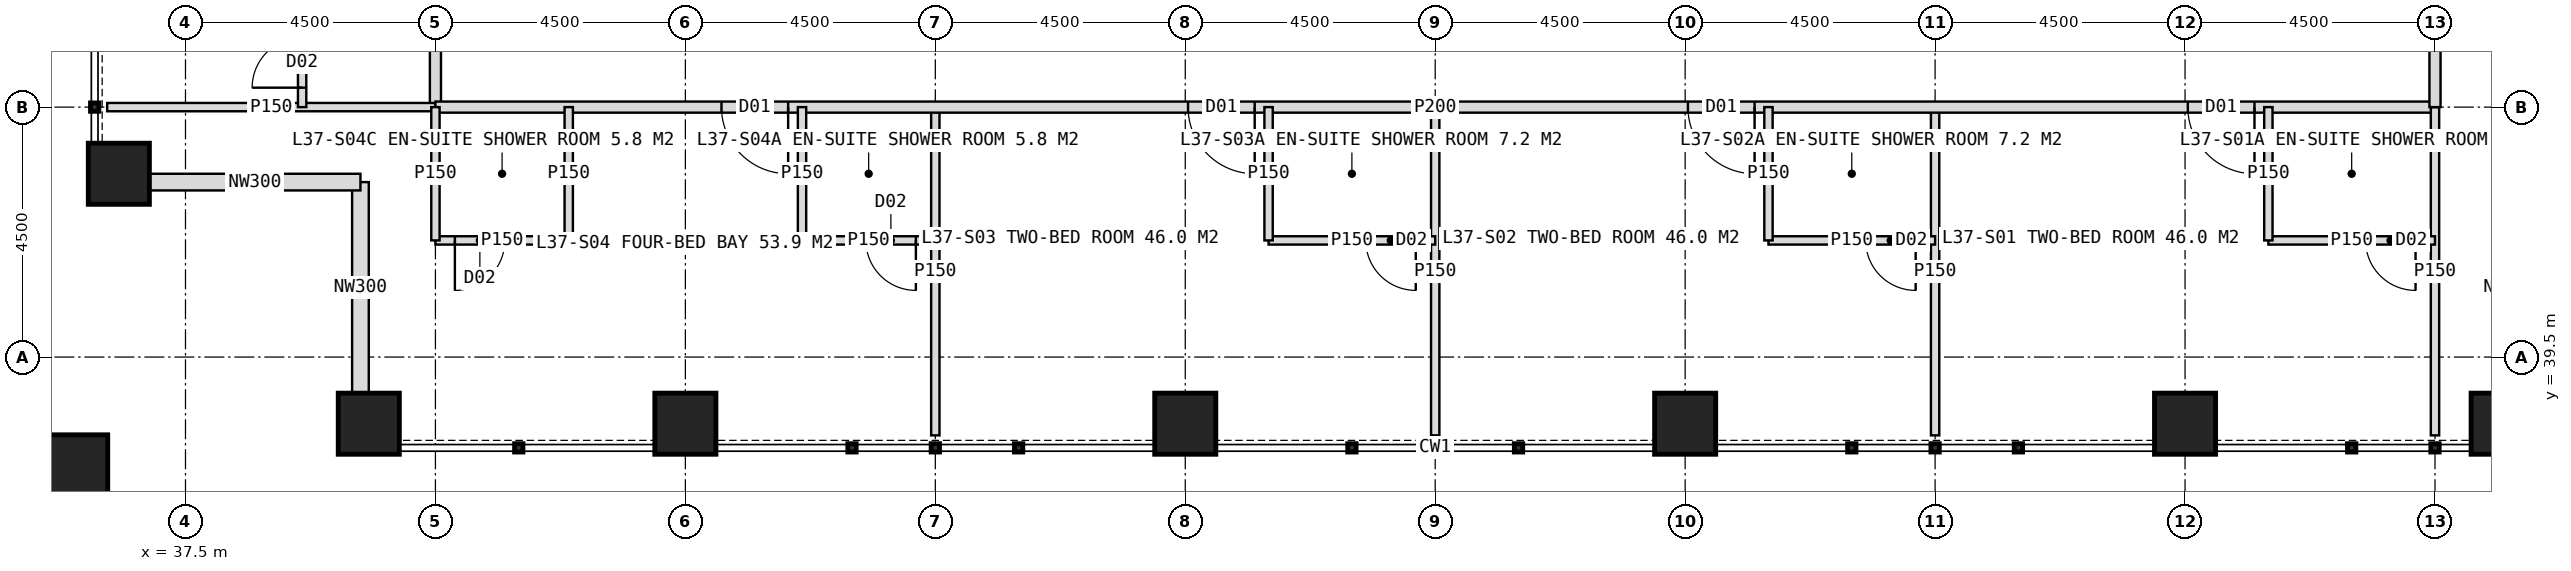
"""IFC4 building model, lengths in metres.
Left out: names, types, materials, properties, quantities, classifications, styles, units other than length and angle.
Written with IfcOpenShell. Run it as: python <this file> out.ifc"""

import sys

from ifc_helpers import new_model, si_unit, direction, frame, frame_2d, origin, origin_2d, place, context, subcontext, project, spatial, rectangle, hollow_rectangle, extrude, element, fill, save


model = new_model("IFC4")
c1 = context("Model", 3, precision=1e-05, world=origin(), true_north=direction((0.0, 1.0)))
c2 = subcontext(c1, "Body", "Model", "MODEL_VIEW")
j1 = project(units=[si_unit("LENGTHUNIT", "METRE"), si_unit("PLANEANGLEUNIT", "RADIAN")], contexts=[c1])
p1 = place(None, origin())
s1 = spatial("IfcSite", under=j1, at=p1, CompositionType="ELEMENT")
p2 = place(p1, origin())
s2 = spatial("IfcBuilding", under=s1, at=p2, CompositionType="ELEMENT")
p3 = place(p2, frame((0.0, 0.0, 156.0)))
s3 = spatial("IfcBuildingStorey", under=s2, at=p3, CompositionType="ELEMENT", Elevation=156.0)
for number, where, z_axis, x_axis in (
    (1, (40.8, 38.3, 0.0), (0.0, 0.0, 1.0), (1.0, 0.0, 0.0)),
    (2, (36.3, 42.8, 0.0), (0.0, 0.0, 1.0), (1.0, 0.0, 0.0)),
    (3, (46.5, 38.3, 0.0), (0.0, 0.0, 1.0), (1.0, 0.0, 0.0)),
    (4, (55.5, 38.3, 0.0), (0.0, 0.0, 1.0), (1.0, 0.0, 0.0)),
    (5, (64.5, 38.3, 0.0), (0.0, 0.0, 1.0), (1.0, 0.0, 0.0)),
    (6, (73.5, 38.3, 0.0), (0.0, 0.0, 1.0), (1.0, 0.0, 0.0)),
    (7, (79.2, 38.3, 0.0), (0.0, 0.0, 1.0), (1.0, 0.0, 0.0)),
):
    element("IfcColumn", number, at=place(p3, frame(where, z_axis=z_axis, x_axis=x_axis)), inside=s3, PredefinedType="COLUMN", context=c2, shape_type="SweptSolid", body=[
        extrude(hollow_rectangle(XDim=1.1, YDim=1.1, WallThickness=0.1, at=origin_2d()), origin(), (0.0, 0.0, 1.0), 4.0),
    ])
p4 = place(p3, frame((35.4, 37.4, 0.0), z_axis=(0.0, 0.0, 1.0), x_axis=(1.0, 0.0, 0.0)))
e8 = element("IfcColumn", 8, at=p4, inside=s3, PredefinedType="COLUMN", context=c2, shape_type="SweptSolid", body=[
    extrude(hollow_rectangle(XDim=1.4, YDim=1.4, WallThickness=0.08, at=origin_2d()), origin(), (0.0, 0.0, 1.0), 4.0),
])
for number, where, z_axis, x_axis in (
    (9, (40.65, 38.85, 0.0), (0.0, 0.0, 1.0), (0.0, 1.0, 0.0)),
    (10, (40.65, 42.65, 0.0), (0.0, 0.0, 1.0), (-1.0, 0.0, 0.0)),
):
    element("IfcWall", number, at=place(p3, frame(where, z_axis=z_axis, x_axis=x_axis)), inside=s3, PredefinedType="ELEMENTEDWALL", context=c2, shape_type="SweptSolid", body=[
        extrude(rectangle(XDim=3.8, YDim=0.3, at=frame_2d((1.9, 0.0))), origin(), (0.0, 0.0, 1.0), 4.0),
    ])
p5 = place(p3, frame((42.0, 44.0, 0.0), z_axis=(0.0, 0.0, 1.0), x_axis=(0.0, 1.0, 0.0)))
e11 = element("IfcWall", 11, at=p5, inside=s3, PredefinedType="PARTITIONING", context=c2, shape_type="SweptSolid", body=[
    extrude(rectangle(XDim=36.0, YDim=0.2, at=frame_2d((18.0, 0.0))), origin(), (0.0, 0.0, 1.0), 3.75),
])
p6 = place(p5, frame((3.25, 0.0, 0.0)))
e12 = element("IfcOpeningElement", 12, at=p6, cuts=e11, PredefinedType="OPENING", context=c2, shape_type="SweptSolid", body=[
    extrude(rectangle(XDim=1.2, YDim=2.2, at=frame_2d((0.6, 1.1))), frame((0.0, 0.11, 0.0), z_axis=(0.0, -1.0, 0.0), x_axis=(1.0, 0.0, 0.0)), (0.0, 0.0, 1.0), 0.22),
])
p7 = place(p5, frame((12.25, 0.0, 0.0)))
e13 = element("IfcOpeningElement", 13, at=p7, cuts=e11, PredefinedType="OPENING", context=c2, shape_type="SweptSolid", body=[
    extrude(rectangle(XDim=1.2, YDim=2.2, at=frame_2d((0.6, 1.1))), frame((0.0, 0.11, 0.0), z_axis=(0.0, -1.0, 0.0), x_axis=(1.0, 0.0, 0.0)), (0.0, 0.0, 1.0), 0.22),
])
p8 = place(p5, frame((21.25, 0.0, 0.0)))
e14 = element("IfcOpeningElement", 14, at=p8, cuts=e11, PredefinedType="OPENING", context=c2, shape_type="SweptSolid", body=[
    extrude(rectangle(XDim=1.2, YDim=2.2, at=frame_2d((0.6, 1.1))), frame((0.0, 0.11, 0.0), z_axis=(0.0, -1.0, 0.0), x_axis=(1.0, 0.0, 0.0)), (0.0, 0.0, 1.0), 0.22),
])
p9 = place(p5, frame((31.75, 0.0, 0.0)))
e15 = element("IfcOpeningElement", 15, at=p9, cuts=e11, PredefinedType="OPENING", context=c2, shape_type="SweptSolid", body=[
    extrude(rectangle(XDim=1.2, YDim=2.2, at=frame_2d((0.6, 1.1))), frame((0.0, 0.11, 0.0), z_axis=(0.0, -1.0, 0.0), x_axis=(1.0, 0.0, 0.0)), (0.0, 0.0, 1.0), 0.22),
])
p10 = place(p3, frame((42.0, 44.0, 0.0), z_axis=(0.0, 0.0, 1.0), x_axis=(-1.0, 0.0, 0.0)))
e16 = element("IfcWall", 16, at=p10, inside=s3, PredefinedType="PARTITIONING", context=c2, shape_type="SweptSolid", body=[
    extrude(rectangle(XDim=5.91, YDim=0.15, at=frame_2d((2.955, 0.0))), origin(), (0.0, 0.0, 1.0), 3.75),
])
p11 = place(p3, frame((39.6, 44.0, 0.0), z_axis=(0.0, 0.0, 1.0), x_axis=(0.0, 1.0, 0.0)))
e17 = element("IfcWall", 17, at=p11, inside=s3, PredefinedType="PARTITIONING", context=c2, shape_type="SweptSolid", body=[
    extrude(rectangle(XDim=3.0, YDim=0.15, at=frame_2d((1.5, 0.0))), origin(), (0.0, 0.0, 1.0), 3.75),
])
p12 = place(p11, frame((0.35, 0.0, 0.0)))
e18 = element("IfcOpeningElement", 18, at=p12, cuts=e17, PredefinedType="OPENING", context=c2, shape_type="SweptSolid", body=[
    extrude(rectangle(XDim=0.9, YDim=2.1, at=frame_2d((0.45, 1.05))), frame((0.0, 0.085, 0.0), z_axis=(0.0, -1.0, 0.0), x_axis=(1.0, 0.0, 0.0)), (0.0, 0.0, 1.0), 0.17),
])
p13 = place(p3, frame((69.0, 44.0, 0.0), z_axis=(0.0, 0.0, 1.0), x_axis=(0.0, -1.0, 0.0)))
e19 = element("IfcWall", 19, at=p13, inside=s3, PredefinedType="PARTITIONING", context=c2, shape_type="SweptSolid", body=[
    extrude(rectangle(XDim=5.91, YDim=0.15, at=frame_2d((2.955, 0.0))), origin(), (0.0, 0.0, 1.0), 3.75),
])
p14 = place(p3, frame((60.0, 44.0, 0.0), z_axis=(0.0, 0.0, 1.0), x_axis=(0.0, -1.0, 0.0)))
e20 = element("IfcWall", 20, at=p14, inside=s3, PredefinedType="PARTITIONING", context=c2, shape_type="SweptSolid", body=[
    extrude(rectangle(XDim=5.91, YDim=0.15, at=frame_2d((2.955, 0.0))), origin(), (0.0, 0.0, 1.0), 2.95),
])
p15 = place(p3, frame((51.0, 44.0, 0.0), z_axis=(0.0, 0.0, 1.0), x_axis=(0.0, -1.0, 0.0)))
e21 = element("IfcWall", 21, at=p15, inside=s3, PredefinedType="PARTITIONING", context=c2, shape_type="SweptSolid", body=[
    extrude(rectangle(XDim=5.91, YDim=0.15, at=frame_2d((2.955, 0.0))), origin(), (0.0, 0.0, 1.0), 3.75),
])
p16 = place(p3, frame((78.0, 44.0, 0.0), z_axis=(0.0, 0.0, 1.0), x_axis=(-1.0, 0.0, 0.0)))
e22 = element("IfcWall", 22, at=p16, inside=s3, PredefinedType="PARTITIONING", context=c2, shape_type="SweptSolid", body=[
    extrude(rectangle(XDim=36.0, YDim=0.2, at=frame_2d((18.0, 0.0))), origin(), (0.0, 0.0, 1.0), 3.75),
])
p17 = place(p16, frame((3.25, 0.0, 0.0)))
e23 = element("IfcOpeningElement", 23, at=p17, cuts=e22, PredefinedType="OPENING", context=c2, shape_type="SweptSolid", body=[
    extrude(rectangle(XDim=1.2, YDim=2.2, at=frame_2d((0.6, 1.1))), frame((0.0, 0.11, 0.0), z_axis=(0.0, -1.0, 0.0), x_axis=(1.0, 0.0, 0.0)), (0.0, 0.0, 1.0), 0.22),
])
p18 = place(p16, frame((12.25, 0.0, 0.0)))
e24 = element("IfcOpeningElement", 24, at=p18, cuts=e22, PredefinedType="OPENING", context=c2, shape_type="SweptSolid", body=[
    extrude(rectangle(XDim=1.2, YDim=2.2, at=frame_2d((0.6, 1.1))), frame((0.0, 0.11, 0.0), z_axis=(0.0, -1.0, 0.0), x_axis=(1.0, 0.0, 0.0)), (0.0, 0.0, 1.0), 0.22),
])
p19 = place(p16, frame((21.25, 0.0, 0.0)))
e25 = element("IfcOpeningElement", 25, at=p19, cuts=e22, PredefinedType="OPENING", context=c2, shape_type="SweptSolid", body=[
    extrude(rectangle(XDim=1.2, YDim=2.2, at=frame_2d((0.6, 1.1))), frame((0.0, 0.11, 0.0), z_axis=(0.0, -1.0, 0.0), x_axis=(1.0, 0.0, 0.0)), (0.0, 0.0, 1.0), 0.22),
])
p20 = place(p16, frame((29.65, 0.0, 0.0)))
e26 = element("IfcOpeningElement", 26, at=p20, cuts=e22, PredefinedType="OPENING", context=c2, shape_type="SweptSolid", body=[
    extrude(rectangle(XDim=1.2, YDim=2.2, at=frame_2d((0.6, 1.1))), frame((0.0, 0.11, 0.0), z_axis=(0.0, -1.0, 0.0), x_axis=(1.0, 0.0, 0.0)), (0.0, 0.0, 1.0), 0.22),
])
p21 = place(p3, frame((78.0, 44.0, 0.0), z_axis=(0.0, 0.0, 1.0), x_axis=(0.0, -1.0, 0.0)))
e27 = element("IfcWall", 27, at=p21, inside=s3, PredefinedType="PARTITIONING", context=c2, shape_type="SweptSolid", body=[
    extrude(rectangle(XDim=5.91, YDim=0.15, at=frame_2d((2.955, 0.0))), origin(), (0.0, 0.0, 1.0), 3.75),
])
p22 = place(p3, frame((78.0, 41.6, 0.0), z_axis=(0.0, 0.0, 1.0), x_axis=(-1.0, 0.0, 0.0)))
e28 = element("IfcWall", 28, at=p22, inside=s3, PredefinedType="PARTITIONING", context=c2, shape_type="SweptSolid", body=[
    extrude(rectangle(XDim=3.0, YDim=0.15, at=frame_2d((1.5, 0.0))), origin(), (0.0, 0.0, 1.0), 3.75),
])
p23 = place(p22, frame((0.35, 0.0, 0.0)))
e29 = element("IfcOpeningElement", 29, at=p23, cuts=e28, PredefinedType="OPENING", context=c2, shape_type="SweptSolid", body=[
    extrude(rectangle(XDim=0.9, YDim=2.1, at=frame_2d((0.45, 1.05))), frame((0.0, 0.085, 0.0), z_axis=(0.0, -1.0, 0.0), x_axis=(1.0, 0.0, 0.0)), (0.0, 0.0, 1.0), 0.17),
])
p24 = place(p3, frame((75.0, 44.0, 0.0), z_axis=(0.0, 0.0, 1.0), x_axis=(0.0, -1.0, 0.0)))
e30 = element("IfcWall", 30, at=p24, inside=s3, PredefinedType="PARTITIONING", context=c2, shape_type="SweptSolid", body=[
    extrude(rectangle(XDim=2.4, YDim=0.15, at=frame_2d((1.2, 0.0))), origin(), (0.0, 0.0, 1.0), 3.75),
])
p25 = place(p3, frame((69.0, 41.6, 0.0), z_axis=(0.0, 0.0, 1.0), x_axis=(-1.0, 0.0, 0.0)))
e31 = element("IfcWall", 31, at=p25, inside=s3, PredefinedType="PARTITIONING", context=c2, shape_type="SweptSolid", body=[
    extrude(rectangle(XDim=3.0, YDim=0.15, at=frame_2d((1.5, 0.0))), origin(), (0.0, 0.0, 1.0), 3.75),
])
p26 = place(p25, frame((0.35, 0.0, 0.0)))
e32 = element("IfcOpeningElement", 32, at=p26, cuts=e31, PredefinedType="OPENING", context=c2, shape_type="SweptSolid", body=[
    extrude(rectangle(XDim=0.9, YDim=2.1, at=frame_2d((0.45, 1.05))), frame((0.0, 0.085, 0.0), z_axis=(0.0, -1.0, 0.0), x_axis=(1.0, 0.0, 0.0)), (0.0, 0.0, 1.0), 0.17),
])
p27 = place(p3, frame((66.0, 44.0, 0.0), z_axis=(0.0, 0.0, 1.0), x_axis=(0.0, -1.0, 0.0)))
e33 = element("IfcWall", 33, at=p27, inside=s3, PredefinedType="PARTITIONING", context=c2, shape_type="SweptSolid", body=[
    extrude(rectangle(XDim=2.4, YDim=0.15, at=frame_2d((1.2, 0.0))), origin(), (0.0, 0.0, 1.0), 3.75),
])
p28 = place(p3, frame((60.0, 41.6, 0.0), z_axis=(0.0, 0.0, 1.0), x_axis=(-1.0, 0.0, 0.0)))
e34 = element("IfcWall", 34, at=p28, inside=s3, PredefinedType="PARTITIONING", context=c2, shape_type="SweptSolid", body=[
    extrude(rectangle(XDim=3.0, YDim=0.15, at=frame_2d((1.5, 0.0))), origin(), (0.0, 0.0, 1.0), 3.75),
])
p29 = place(p28, frame((0.35, 0.0, 0.0)))
e35 = element("IfcOpeningElement", 35, at=p29, cuts=e34, PredefinedType="OPENING", context=c2, shape_type="SweptSolid", body=[
    extrude(rectangle(XDim=0.9, YDim=2.1, at=frame_2d((0.45, 1.05))), frame((0.0, 0.085, 0.0), z_axis=(0.0, -1.0, 0.0), x_axis=(1.0, 0.0, 0.0)), (0.0, 0.0, 1.0), 0.17),
])
p30 = place(p3, frame((57.0, 44.0, 0.0), z_axis=(0.0, 0.0, 1.0), x_axis=(0.0, -1.0, 0.0)))
e36 = element("IfcWall", 36, at=p30, inside=s3, PredefinedType="PARTITIONING", context=c2, shape_type="SweptSolid", body=[
    extrude(rectangle(XDim=2.4, YDim=0.15, at=frame_2d((1.2, 0.0))), origin(), (0.0, 0.0, 1.0), 3.75),
])
p31 = place(p3, frame((51.0, 41.6, 0.0), z_axis=(0.0, 0.0, 1.0), x_axis=(-1.0, 0.0, 0.0)))
e37 = element("IfcWall", 37, at=p31, inside=s3, PredefinedType="PARTITIONING", context=c2, shape_type="SweptSolid", body=[
    extrude(rectangle(XDim=2.4, YDim=0.15, at=frame_2d((1.2, 0.0))), origin(), (0.0, 0.0, 1.0), 3.75),
])
p32 = place(p31, frame((0.35, 0.0, 0.0)))
e38 = element("IfcOpeningElement", 38, at=p32, cuts=e37, PredefinedType="OPENING", context=c2, shape_type="SweptSolid", body=[
    extrude(rectangle(XDim=0.9, YDim=2.1, at=frame_2d((0.45, 1.05))), frame((0.0, 0.085, 0.0), z_axis=(0.0, -1.0, 0.0), x_axis=(1.0, 0.0, 0.0)), (0.0, 0.0, 1.0), 0.17),
])
p33 = place(p3, frame((48.6, 44.0, 0.0), z_axis=(0.0, 0.0, 1.0), x_axis=(0.0, -1.0, 0.0)))
e39 = element("IfcWall", 39, at=p33, inside=s3, PredefinedType="PARTITIONING", context=c2, shape_type="SweptSolid", body=[
    extrude(rectangle(XDim=2.4, YDim=0.15, at=frame_2d((1.2, 0.0))), origin(), (0.0, 0.0, 1.0), 3.75),
])
p34 = place(p3, frame((44.4, 41.6, 0.0), z_axis=(0.0, 0.0, 1.0), x_axis=(-1.0, 0.0, 0.0)))
e40 = element("IfcWall", 40, at=p34, inside=s3, PredefinedType="PARTITIONING", context=c2, shape_type="SweptSolid", body=[
    extrude(rectangle(XDim=2.4, YDim=0.15, at=frame_2d((1.2, 0.0))), origin(), (0.0, 0.0, 1.0), 3.75),
])
p35 = place(p34, frame((1.15, 0.0, 0.0)))
e41 = element("IfcOpeningElement", 41, at=p35, cuts=e40, PredefinedType="OPENING", context=c2, shape_type="SweptSolid", body=[
    extrude(rectangle(XDim=0.9, YDim=2.1, at=frame_2d((0.45, 1.05))), frame((0.0, 0.085, 0.0), z_axis=(0.0, -1.0, 0.0), x_axis=(1.0, 0.0, 0.0)), (0.0, 0.0, 1.0), 0.17),
])
for number, where, z_axis, x_axis in (
    (42, (44.4, 44.0, 0.0), (0.0, 0.0, 1.0), (0.0, -1.0, 0.0)),
    (43, (42.0, 44.0, 0.0), (0.0, 0.0, 1.0), (0.0, -1.0, 0.0)),
):
    element("IfcWall", number, at=place(p3, frame(where, z_axis=z_axis, x_axis=x_axis)), inside=s3, PredefinedType="PARTITIONING", context=c2, shape_type="SweptSolid", body=[
        extrude(rectangle(XDim=2.4, YDim=0.15, at=frame_2d((1.2, 0.0))), origin(), (0.0, 0.0, 1.0), 3.75),
    ])
p36 = place(p3, frame((78.0, 80.0, 0.0), z_axis=(0.0, 0.0, 1.0), x_axis=(0.0, -1.0, 0.0)))
e44 = element("IfcWall", 44, at=p36, inside=s3, PredefinedType="PARTITIONING", context=c2, shape_type="SweptSolid", body=[
    extrude(rectangle(XDim=36.0, YDim=0.2, at=frame_2d((18.0, 0.0))), origin(), (0.0, 0.0, 1.0), 3.75),
])
p37 = place(p36, frame((3.25, 0.0, 0.0)))
e45 = element("IfcOpeningElement", 45, at=p37, cuts=e44, PredefinedType="OPENING", context=c2, shape_type="SweptSolid", body=[
    extrude(rectangle(XDim=1.2, YDim=2.2, at=frame_2d((0.6, 1.1))), frame((0.0, 0.11, 0.0), z_axis=(0.0, -1.0, 0.0), x_axis=(1.0, 0.0, 0.0)), (0.0, 0.0, 1.0), 0.22),
])
p38 = place(p36, frame((10.75, 0.0, 0.0)))
e46 = element("IfcOpeningElement", 46, at=p38, cuts=e44, PredefinedType="OPENING", context=c2, shape_type="SweptSolid", body=[
    extrude(rectangle(XDim=1.2, YDim=2.2, at=frame_2d((0.6, 1.1))), frame((0.0, 0.11, 0.0), z_axis=(0.0, -1.0, 0.0), x_axis=(1.0, 0.0, 0.0)), (0.0, 0.0, 1.0), 0.22),
])
p39 = place(p36, frame((21.25, 0.0, 0.0)))
e47 = element("IfcOpeningElement", 47, at=p39, cuts=e44, PredefinedType="OPENING", context=c2, shape_type="SweptSolid", body=[
    extrude(rectangle(XDim=1.2, YDim=2.2, at=frame_2d((0.6, 1.1))), frame((0.0, 0.11, 0.0), z_axis=(0.0, -1.0, 0.0), x_axis=(1.0, 0.0, 0.0)), (0.0, 0.0, 1.0), 0.22),
])
p40 = place(p36, frame((31.75, 0.0, 0.0)))
e48 = element("IfcOpeningElement", 48, at=p40, cuts=e44, PredefinedType="OPENING", context=c2, shape_type="SweptSolid", body=[
    extrude(rectangle(XDim=1.2, YDim=2.2, at=frame_2d((0.6, 1.1))), frame((0.0, 0.11, 0.0), z_axis=(0.0, -1.0, 0.0), x_axis=(1.0, 0.0, 0.0)), (0.0, 0.0, 1.0), 0.22),
])
p41 = place(p12, origin())
e49 = element("IfcDoor", 49, at=p41, inside=s3, OperationType="SINGLE_SWING_LEFT", PredefinedType="DOOR", context=c2, shape_type="SweptSolid", body=[
    extrude(rectangle(XDim=0.9, YDim=2.1, at=frame_2d((0.45, 1.05))), frame((0.0, 0.025, 0.0), z_axis=(0.0, -1.0, 0.0), x_axis=(1.0, 0.0, 0.0)), (0.0, 0.0, 1.0), 0.05),
])
fill(e18, e49)
p42 = place(p17, origin())
e50 = element("IfcDoor", 50, at=p42, inside=s3, OperationType="SINGLE_SWING_LEFT", PredefinedType="DOOR", context=c2, shape_type="SweptSolid", body=[
    extrude(rectangle(XDim=1.2, YDim=2.2, at=frame_2d((0.6, 1.1))), frame((0.0, 0.025, 0.0), z_axis=(0.0, -1.0, 0.0), x_axis=(1.0, 0.0, 0.0)), (0.0, 0.0, 1.0), 0.05),
])
fill(e23, e50)
p43 = place(p23, origin())
e51 = element("IfcDoor", 51, at=p43, inside=s3, OperationType="SINGLE_SWING_LEFT", PredefinedType="DOOR", context=c2, shape_type="SweptSolid", body=[
    extrude(rectangle(XDim=0.9, YDim=2.1, at=frame_2d((0.45, 1.05))), frame((0.0, 0.025, 0.0), z_axis=(0.0, -1.0, 0.0), x_axis=(1.0, 0.0, 0.0)), (0.0, 0.0, 1.0), 0.05),
])
fill(e29, e51)
p44 = place(p18, origin())
e52 = element("IfcDoor", 52, at=p44, inside=s3, OperationType="SINGLE_SWING_LEFT", PredefinedType="DOOR", context=c2, shape_type="SweptSolid", body=[
    extrude(rectangle(XDim=1.2, YDim=2.2, at=frame_2d((0.6, 1.1))), frame((0.0, 0.025, 0.0), z_axis=(0.0, -1.0, 0.0), x_axis=(1.0, 0.0, 0.0)), (0.0, 0.0, 1.0), 0.05),
])
fill(e24, e52)
p45 = place(p26, origin())
e53 = element("IfcDoor", 53, at=p45, inside=s3, OperationType="SINGLE_SWING_LEFT", PredefinedType="DOOR", context=c2, shape_type="SweptSolid", body=[
    extrude(rectangle(XDim=0.9, YDim=2.1, at=frame_2d((0.45, 1.05))), frame((0.0, 0.025, 0.0), z_axis=(0.0, -1.0, 0.0), x_axis=(1.0, 0.0, 0.0)), (0.0, 0.0, 1.0), 0.05),
])
fill(e32, e53)
p46 = place(p19, origin())
e54 = element("IfcDoor", 54, at=p46, inside=s3, OperationType="SINGLE_SWING_LEFT", PredefinedType="DOOR", context=c2, shape_type="SweptSolid", body=[
    extrude(rectangle(XDim=1.2, YDim=2.2, at=frame_2d((0.6, 1.1))), frame((0.0, 0.025, 0.0), z_axis=(0.0, -1.0, 0.0), x_axis=(1.0, 0.0, 0.0)), (0.0, 0.0, 1.0), 0.05),
])
fill(e25, e54)
p47 = place(p29, origin())
e55 = element("IfcDoor", 55, at=p47, inside=s3, OperationType="SINGLE_SWING_LEFT", PredefinedType="DOOR", context=c2, shape_type="SweptSolid", body=[
    extrude(rectangle(XDim=0.9, YDim=2.1, at=frame_2d((0.45, 1.05))), frame((0.0, 0.025, 0.0), z_axis=(0.0, -1.0, 0.0), x_axis=(1.0, 0.0, 0.0)), (0.0, 0.0, 1.0), 0.05),
])
fill(e35, e55)
p48 = place(p20, origin())
e56 = element("IfcDoor", 56, at=p48, inside=s3, OperationType="SINGLE_SWING_LEFT", PredefinedType="DOOR", context=c2, shape_type="SweptSolid", body=[
    extrude(rectangle(XDim=1.2, YDim=2.2, at=frame_2d((0.6, 1.1))), frame((0.0, 0.025, 0.0), z_axis=(0.0, -1.0, 0.0), x_axis=(1.0, 0.0, 0.0)), (0.0, 0.0, 1.0), 0.05),
])
fill(e26, e56)
p49 = place(p32, origin())
e57 = element("IfcDoor", 57, at=p49, inside=s3, OperationType="SINGLE_SWING_LEFT", PredefinedType="DOOR", context=c2, shape_type="SweptSolid", body=[
    extrude(rectangle(XDim=0.9, YDim=2.1, at=frame_2d((0.45, 1.05))), frame((0.0, 0.025, 0.0), z_axis=(0.0, -1.0, 0.0), x_axis=(1.0, 0.0, 0.0)), (0.0, 0.0, 1.0), 0.05),
])
fill(e38, e57)
p50 = place(p35, origin())
e58 = element("IfcDoor", 58, at=p50, inside=s3, OperationType="SINGLE_SWING_RIGHT", PredefinedType="DOOR", context=c2, shape_type="SweptSolid", body=[
    extrude(rectangle(XDim=0.9, YDim=2.1, at=frame_2d((0.45, 1.05))), frame((0.0, 0.025, 0.0), z_axis=(0.0, -1.0, 0.0), x_axis=(1.0, 0.0, 0.0)), (0.0, 0.0, 1.0), 0.05),
])
fill(e41, e58)
save(model, sys.argv[1])
